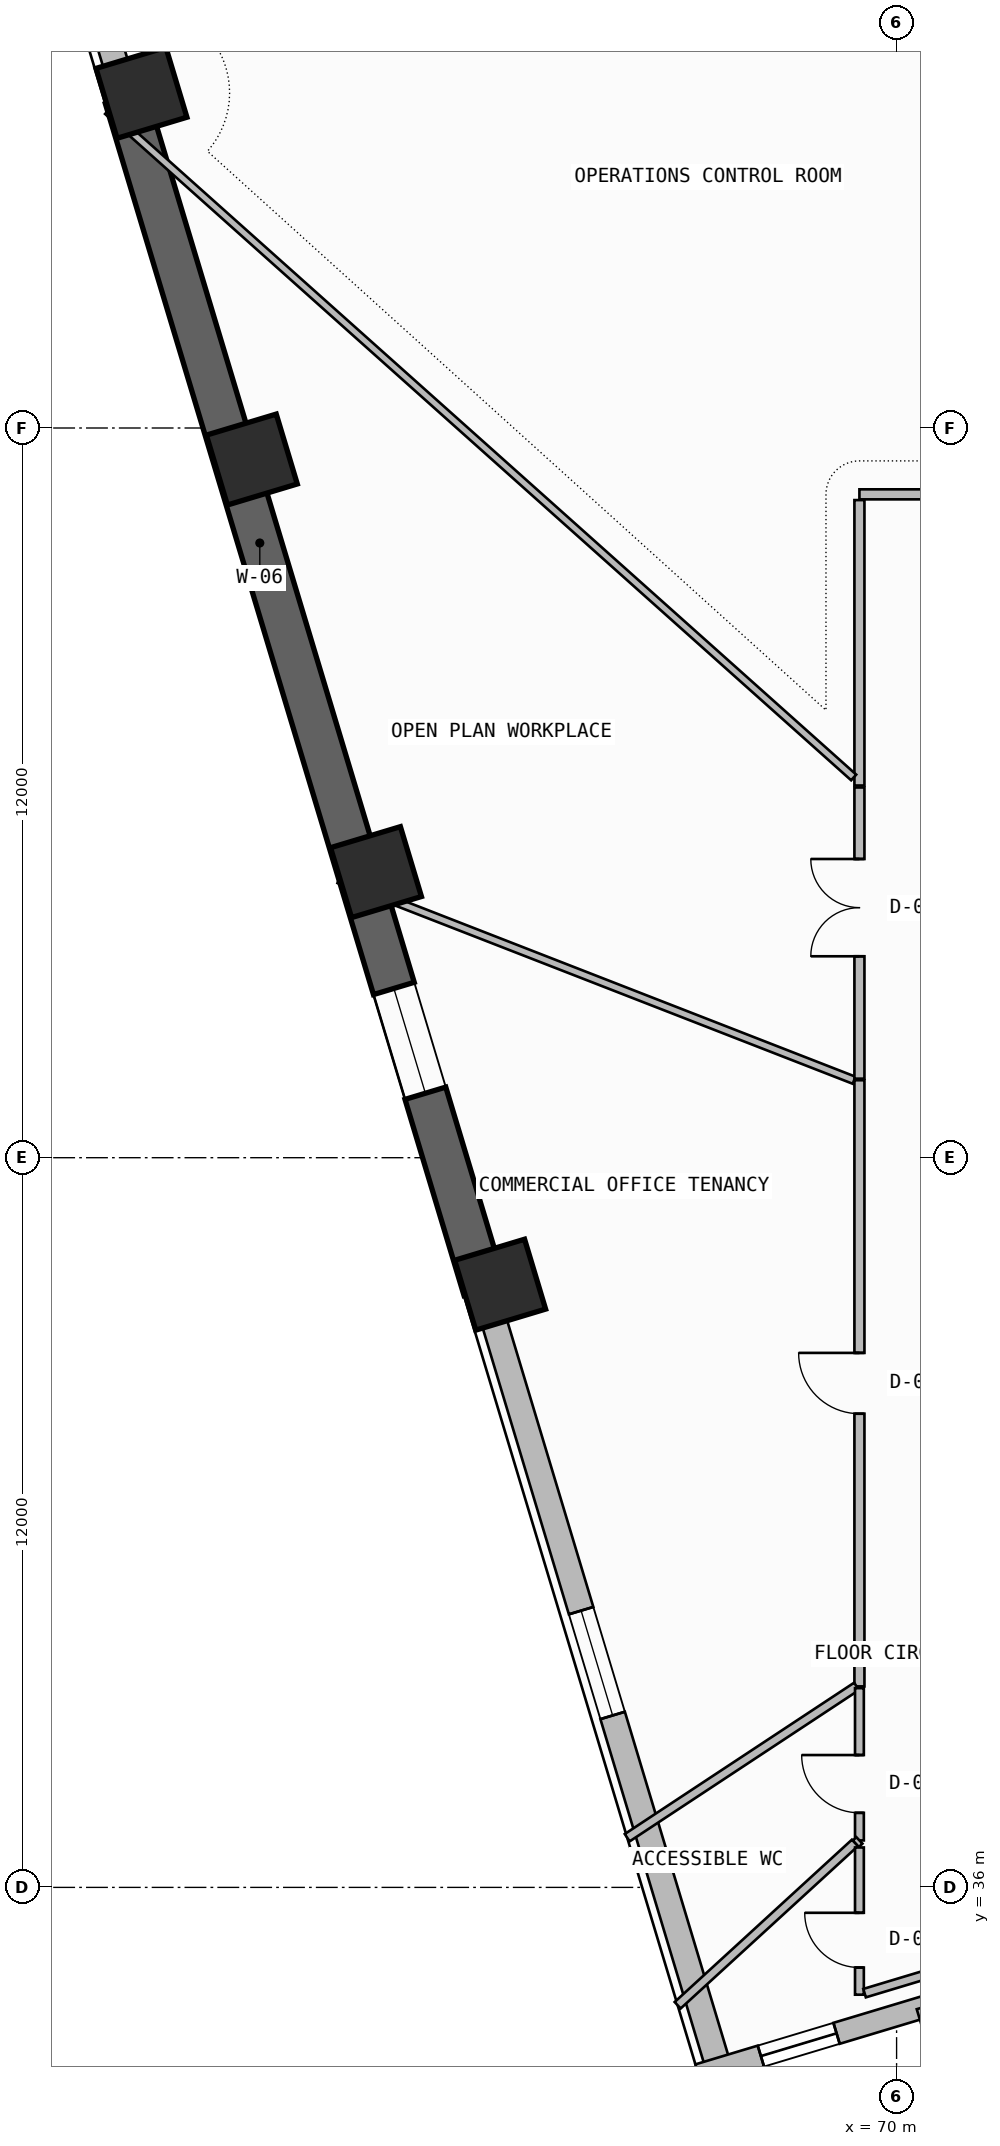
"""IFC4 building model, lengths in metres.
Left out: names, types, materials, properties, quantities, classifications, styles, units other than length and angle.
Written with IfcOpenShell. Run it as: python <this file> out.ifc"""

import sys

from ifc_helpers import new_model, si_unit, direction, frame, frame_2d, origin, origin_2d, place, context, subcontext, project, spatial, rectangle, extrude, element, fill, save


model = new_model("IFC4")
c1 = context("Model", 3, precision=1e-05, world=origin(), true_north=direction((0.0, 1.0)))
c2 = subcontext(c1, "Body", "Model", "MODEL_VIEW")
j1 = project(units=[si_unit("LENGTHUNIT", "METRE"), si_unit("PLANEANGLEUNIT", "RADIAN")], contexts=[c1])
p1 = place(None, origin())
s1 = spatial("IfcSite", under=j1, at=p1, CompositionType="ELEMENT")
p2 = place(p1, origin())
s2 = spatial("IfcBuilding", under=s1, at=p2, CompositionType="ELEMENT")
p3 = place(p2, frame((0.0, 0.0, 157.5)))
s3 = spatial("IfcBuildingStorey", under=s2, at=p3, CompositionType="ELEMENT", Elevation=157.5)
for number, where, z_axis, x_axis in (
    (1, (57.581, 65.512, 0.0), (0.0, 0.0, 1.0), (-0.288, 0.958, 0.0)),
    (2, (59.396, 59.481, 0.0), (0.0, 0.0, 1.0), (-0.288, 0.958, 0.0)),
    (3, (61.438, 52.696, 0.0), (0.0, 0.0, 1.0), (-0.288, 0.958, 0.0)),
    (4, (63.48, 45.912, 0.0), (0.0, 0.0, 1.0), (-0.288, 0.958, 0.0)),
):
    element("IfcColumn", number, at=place(p3, frame(where, z_axis=z_axis, x_axis=x_axis)), inside=s3, PredefinedType="COLUMN", context=c2, shape_type="SweptSolid", body=[
        extrude(rectangle(XDim=1.2, YDim=1.2, at=origin_2d()), origin(), (0.0, 0.0, 1.0), 3.6),
    ])
p4 = place(p3, frame((55.734, 70.711, 0.0), z_axis=(0.0, 0.0, 1.0), x_axis=(0.288221590884, -0.957563739157, 0.0)))
e5 = element("IfcWall", 5, at=p4, inside=s3, PredefinedType="SOLIDWALL", context=c2, shape_type="SweptSolid", body=[
    extrude(rectangle(XDim=5.511, YDim=0.42, at=frame_2d((2.755, 0.0))), origin(), (0.0, 0.0, 1.0), 2.725),
])
p5 = place(p4, frame((1.223, 0.0, 1.2)))
e6 = element("IfcOpeningElement", 6, at=p5, cuts=e5, PredefinedType="OPENING", context=c2, shape_type="SweptSolid", body=[
    extrude(rectangle(XDim=1.8, YDim=0.9, at=frame_2d((0.9, 0.45))), frame((0.0, 0.22, 0.0), z_axis=(0.0, -1.0, 0.0), x_axis=(1.0, 0.0, 0.0)), (0.0, 0.0, 1.0), 0.44),
])
p6 = place(p3, frame((57.323, 65.434, -0.26), z_axis=(0.0, 0.0, 1.0), x_axis=(0.288188159352, -0.957573801234, 0.0)))
e7 = element("IfcWall", 7, at=p6, inside=s3, PredefinedType="SHEAR", context=c2, shape_type="SweptSolid", body=[
    extrude(rectangle(XDim=20.469, YDim=0.7, at=frame_2d((10.234, 0.0))), origin(), (0.0, 0.0, 1.0), 3.6),
])
p7 = place(p6, frame((15.3, 0.0, 1.2)))
e8 = element("IfcOpeningElement", 8, at=p7, cuts=e7, PredefinedType="OPENING", context=c2, shape_type="SweptSolid", body=[
    extrude(rectangle(XDim=1.8, YDim=0.9, at=frame_2d((0.9, 0.45))), frame((0.0, 0.36, 0.0), z_axis=(0.0, -1.0, 0.0), x_axis=(1.0, 0.0, 0.0)), (0.0, 0.0, 1.0), 0.72),
])
p8 = place(p3, frame((63.221, 45.834, 0.0), z_axis=(0.0, 0.0, 1.0), x_axis=(0.288202962273, -0.957569346072, 0.0)))
e9 = element("IfcWall", 9, at=p8, inside=s3, PredefinedType="SOLIDWALL", context=c2, shape_type="SweptSolid", body=[
    extrude(rectangle(XDim=13.384, YDim=0.42, at=frame_2d((6.692, 0.0))), origin(), (0.0, 0.0, 1.0), 2.725),
])
p9 = place(p8, frame((5.517, 0.0, 1.2)))
e10 = element("IfcOpeningElement", 10, at=p9, cuts=e9, PredefinedType="OPENING", context=c2, shape_type="SweptSolid", body=[
    extrude(rectangle(XDim=1.8, YDim=0.9, at=frame_2d((0.9, 0.45))), frame((0.0, 0.22, 0.0), z_axis=(0.0, -1.0, 0.0), x_axis=(1.0, 0.0, 0.0)), (0.0, 0.0, 1.0), 0.44),
])
p10 = place(p3, frame((66.743, 32.917, 0.0), z_axis=(0.0, 0.0, 1.0), x_axis=(0.957584687378, 0.288151985068, 0.0)))
e11 = element("IfcWall", 11, at=p10, inside=s3, PredefinedType="SOLIDWALL", context=c2, shape_type="SweptSolid", body=[
    extrude(rectangle(XDim=3.927, YDim=0.36, at=frame_2d((1.963, 0.0))), origin(), (0.0, 0.0, 1.0), 3.34),
])
p11 = place(p10, frame((1.07, 0.0, 0.45)))
e12 = element("IfcOpeningElement", 12, at=p11, cuts=e11, PredefinedType="OPENING", context=c2, shape_type="SweptSolid", body=[
    extrude(rectangle(XDim=1.3, YDim=2.4, at=frame_2d((0.65, 1.2))), frame((0.0, 0.19, 0.0), z_axis=(0.0, -1.0, 0.0), x_axis=(1.0, 0.0, 0.0)), (0.0, 0.0, 1.0), 0.38),
])
p12 = place(p3, frame((70.504, 34.049, 0.0), z_axis=(0.0, 0.0, 1.0), x_axis=(0.288169140251, -0.957579524952, 0.0)))
e13 = element("IfcWall", 13, at=p12, inside=s3, PredefinedType="SOLIDWALL", context=c2, shape_type="SweptSolid", body=[
    extrude(rectangle(XDim=3.927, YDim=0.36, at=frame_2d((1.963, 0.0))), origin(), (0.0, 0.0, 1.0), 3.34),
])
p13 = place(p3, frame((89.368, 62.13, 0.0), z_axis=(0.0, 0.0, 1.0), x_axis=(-0.942033439765, 0.335518998515, 0.0)))
e14 = element("IfcWall", 14, at=p13, inside=s3, PredefinedType="PARAPET", context=c2, shape_type="SweptSolid", body=[
    extrude(rectangle(XDim=27.969, YDim=0.2, at=frame_2d((13.985, 0.0))), origin(), (0.0, 0.0, 1.0), 1.15),
])
p14 = place(p3, frame((69.389, 49.274, 0.0), z_axis=(0.0, 0.0, 1.0), x_axis=(0.0, -1.0, 0.0)))
e15 = element("IfcWall", 15, at=p14, inside=s3, PredefinedType="PARTITIONING", context=c2, shape_type="SweptSolid", body=[
    extrude(rectangle(XDim=9.968, YDim=0.165, at=frame_2d((4.984, 0.0))), origin(), (0.0, 0.0, 1.0), 3.34),
])
p15 = place(p14, frame((4.484, 0.0, 0.0)))
e16 = element("IfcOpeningElement", 16, at=p15, cuts=e15, PredefinedType="OPENING", context=c2, shape_type="SweptSolid", body=[
    extrude(rectangle(XDim=1.0, YDim=2.2, at=frame_2d((0.5, 1.1))), frame((0.0, 0.093, 0.0), z_axis=(0.0, -1.0, 0.0), x_axis=(1.0, 0.0, 0.0)), (0.0, 0.0, 1.0), 0.185),
])
p16 = place(p3, frame((69.342, 39.306, 0.0), z_axis=(0.0, 0.0, 1.0), x_axis=(-0.83472512809, -0.550666832608, 0.0)))
e17 = element("IfcWall", 17, at=p16, inside=s3, PredefinedType="PARTITIONING", context=c2, shape_type="SweptSolid", body=[
    extrude(rectangle(XDim=4.519, YDim=0.145, at=frame_2d((2.26, 0.0))), origin(), (0.0, 0.0, 1.0), 3.34),
])
p17 = place(p3, frame((60.827, 52.575, 0.0), z_axis=(0.0, 0.0, 1.0), x_axis=(0.931795434886, -0.362983839208, 0.0)))
e18 = element("IfcWall", 18, at=p17, inside=s3, PredefinedType="PARTITIONING", context=c2, shape_type="SweptSolid", body=[
    extrude(rectangle(XDim=9.094, YDim=0.125, at=frame_2d((4.547, 0.0))), origin(), (0.0, 0.0, 1.0), 2.725),
])
p18 = place(p3, frame((69.389, 39.277, 0.0), z_axis=(0.0, 0.0, 1.0), x_axis=(0.0, -1.0, 0.0)))
e19 = element("IfcWall", 19, at=p18, inside=s3, PredefinedType="PARTITIONING", context=c2, shape_type="SweptSolid", body=[
    extrude(rectangle(XDim=2.504, YDim=0.145, at=frame_2d((1.252, 0.0))), origin(), (0.0, 0.0, 1.0), 3.34),
])
p19 = place(p18, frame((1.1, 0.0, 0.0)))
e20 = element("IfcOpeningElement", 20, at=p19, cuts=e19, PredefinedType="OPENING", context=c2, shape_type="SweptSolid", body=[
    extrude(rectangle(XDim=0.95, YDim=2.15, at=frame_2d((0.475, 1.075))), frame((0.0, 0.083, 0.0), z_axis=(0.0, -1.0, 0.0), x_axis=(1.0, 0.0, 0.0)), (0.0, 0.0, 1.0), 0.165),
])
p20 = place(p3, frame((69.389, 36.773, 0.0), z_axis=(0.0, 0.0, 1.0), x_axis=(-0.730366580174, -0.683055384698, 0.0)))
e21 = element("IfcWall", 21, at=p20, inside=s3, PredefinedType="PARTITIONING", context=c2, shape_type="SweptSolid", body=[
    extrude(rectangle(XDim=0.083, YDim=0.145, at=frame_2d((0.041, 0.0))), origin(), (0.0, 0.0, 1.0), 3.34),
])
p21 = place(p3, frame((69.314, 36.731, 0.0), z_axis=(0.0, 0.0, 1.0), x_axis=(-0.737487298625, -0.675361002995, 0.0)))
e22 = element("IfcWall", 22, at=p21, inside=s3, PredefinedType="PARTITIONING", context=c2, shape_type="SweptSolid", body=[
    extrude(rectangle(XDim=3.953, YDim=0.145, at=frame_2d((1.977, 0.0))), origin(), (0.0, 0.0, 1.0), 3.34),
])
p22 = place(p3, frame((69.389, 36.657, 0.0), z_axis=(0.0, 0.0, 1.0), x_axis=(0.0, -1.0, 0.0)))
e23 = element("IfcWall", 23, at=p22, inside=s3, PredefinedType="PARTITIONING", context=c2, shape_type="SweptSolid", body=[
    extrude(rectangle(XDim=2.421, YDim=0.145, at=frame_2d((1.21, 0.0))), origin(), (0.0, 0.0, 1.0), 3.34),
])
p23 = place(p22, frame((1.074, 0.0, 0.0)))
e24 = element("IfcOpeningElement", 24, at=p23, cuts=e23, PredefinedType="OPENING", context=c2, shape_type="SweptSolid", body=[
    extrude(rectangle(XDim=0.9, YDim=2.1, at=frame_2d((0.45, 1.05))), frame((0.0, 0.083, 0.0), z_axis=(0.0, -1.0, 0.0), x_axis=(1.0, 0.0, 0.0)), (0.0, 0.0, 1.0), 0.165),
])
p24 = place(p3, frame((69.473, 34.261, 0.0), z_axis=(0.0, 0.0, 1.0), x_axis=(0.957576023878, 0.288180773985, 0.0)))
e25 = element("IfcWall", 25, at=p24, inside=s3, PredefinedType="PARTITIONING", context=c2, shape_type="SweptSolid", body=[
    extrude(rectangle(XDim=1.855, YDim=0.145, at=frame_2d((0.928, 0.0))), origin(), (0.0, 0.0, 1.0), 3.34),
])
p25 = place(p3, frame((75.622, 58.909, 0.0), z_axis=(0.0, 0.0, 1.0), x_axis=(-1.0, 0.0, 0.0)))
e26 = element("IfcWall", 26, at=p25, inside=s3, PredefinedType="PARTITIONING", context=c2, shape_type="SweptSolid", body=[
    extrude(rectangle(XDim=6.233, YDim=0.165, at=frame_2d((3.117, 0.0))), origin(), (0.0, 0.0, 1.0), 2.725),
])
p26 = place(p25, frame((1.892, 0.0, 0.0)))
e27 = element("IfcOpeningElement", 27, at=p26, cuts=e26, PredefinedType="OPENING", context=c2, shape_type="SweptSolid", body=[
    extrude(rectangle(XDim=1.0, YDim=2.2, at=frame_2d((0.5, 1.1))), frame((0.0, 0.093, 0.0), z_axis=(0.0, -1.0, 0.0), x_axis=(1.0, 0.0, 0.0)), (0.0, 0.0, 1.0), 0.185),
])
p27 = place(p3, frame((69.389, 58.814, 0.0), z_axis=(0.0, 0.0, 1.0), x_axis=(0.0, -1.0, 0.0)))
e28 = element("IfcWall", 28, at=p27, inside=s3, PredefinedType="PARTITIONING", context=c2, shape_type="SweptSolid", body=[
    extrude(rectangle(XDim=4.694, YDim=0.165, at=frame_2d((2.347, 0.0))), origin(), (0.0, 0.0, 1.0), 2.725),
])
p28 = place(p3, frame((69.294, 54.253, 0.0), z_axis=(0.0, 0.0, 1.0), x_axis=(-0.745872091983, 0.666089200033, 0.0)))
e29 = element("IfcWall", 29, at=p28, inside=s3, PredefinedType="PARTITIONING", context=c2, shape_type="SweptSolid", body=[
    extrude(rectangle(XDim=16.451, YDim=0.125, at=frame_2d((8.226, 0.0))), origin(), (0.0, 0.0, 1.0), 2.725),
])
p29 = place(p3, frame((69.389, 54.088, 0.0), z_axis=(0.0, 0.0, 1.0), x_axis=(0.0, -1.0, 0.0)))
e30 = element("IfcWall", 30, at=p29, inside=s3, PredefinedType="PARTITIONING", context=c2, shape_type="SweptSolid", body=[
    extrude(rectangle(XDim=4.789, YDim=0.165, at=frame_2d((2.394, 0.0))), origin(), (0.0, 0.0, 1.0), 2.725),
])
p30 = place(p29, frame((1.176, 0.0, 0.0)))
e31 = element("IfcOpeningElement", 31, at=p30, cuts=e30, PredefinedType="OPENING", context=c2, shape_type="SweptSolid", body=[
    extrude(rectangle(XDim=1.6, YDim=2.3, at=frame_2d((0.8, 1.15))), frame((0.0, 0.093, 0.0), z_axis=(0.0, -1.0, 0.0), x_axis=(1.0, 0.0, 0.0)), (0.0, 0.0, 1.0), 0.185),
])
p31 = place(p7, origin())
e32 = element("IfcWindow", 32, at=p31, inside=s3, PartitioningType="SINGLE_PANEL", PredefinedType="WINDOW", context=c2, shape_type="SweptSolid", body=[
    extrude(rectangle(XDim=1.8, YDim=0.9, at=frame_2d((0.9, 0.45))), frame((0.0, 0.03, 0.0), z_axis=(0.0, -1.0, 0.0), x_axis=(1.0, 0.0, 0.0)), (0.0, 0.0, 1.0), 0.06),
])
fill(e8, e32)
p32 = place(p9, origin())
e33 = element("IfcWindow", 33, at=p32, inside=s3, PartitioningType="SINGLE_PANEL", PredefinedType="WINDOW", context=c2, shape_type="SweptSolid", body=[
    extrude(rectangle(XDim=1.8, YDim=0.9, at=frame_2d((0.9, 0.45))), frame((0.0, 0.03, 0.0), z_axis=(0.0, -1.0, 0.0), x_axis=(1.0, 0.0, 0.0)), (0.0, 0.0, 1.0), 0.06),
])
fill(e10, e33)
p33 = place(p11, origin())
e34 = element("IfcWindow", 34, at=p33, inside=s3, PartitioningType="SINGLE_PANEL", PredefinedType="WINDOW", context=c2, shape_type="SweptSolid", body=[
    extrude(rectangle(XDim=1.3, YDim=2.4, at=frame_2d((0.65, 1.2))), frame((0.0, 0.03, 0.0), z_axis=(0.0, -1.0, 0.0), x_axis=(1.0, 0.0, 0.0)), (0.0, 0.0, 1.0), 0.06),
])
fill(e12, e34)
p34 = place(p15, frame((1.0, 0.0, 0.0), z_axis=(0.0, 0.0, 1.0), x_axis=(-1.0, 0.0, 0.0)))
e35 = element("IfcDoor", 35, at=p34, inside=s3, OperationType="SINGLE_SWING_RIGHT", PredefinedType="DOOR", context=c2, shape_type="SweptSolid", body=[
    extrude(rectangle(XDim=1.0, YDim=2.2, at=frame_2d((0.5, 1.1))), frame((0.0, 0.025, 0.0), z_axis=(0.0, -1.0, 0.0), x_axis=(1.0, 0.0, 0.0)), (0.0, 0.0, 1.0), 0.05),
])
fill(e16, e35)
p35 = place(p19, frame((0.95, 0.0, 0.0), z_axis=(0.0, 0.0, 1.0), x_axis=(-1.0, 0.0, 0.0)))
e36 = element("IfcDoor", 36, at=p35, inside=s3, OperationType="SINGLE_SWING_RIGHT", PredefinedType="DOOR", context=c2, shape_type="SweptSolid", body=[
    extrude(rectangle(XDim=0.95, YDim=2.15, at=frame_2d((0.475, 1.075))), frame((0.0, 0.025, 0.0), z_axis=(0.0, -1.0, 0.0), x_axis=(1.0, 0.0, 0.0)), (0.0, 0.0, 1.0), 0.05),
])
fill(e20, e36)
p36 = place(p23, frame((0.9, 0.0, 0.0), z_axis=(0.0, 0.0, 1.0), x_axis=(-1.0, 0.0, 0.0)))
e37 = element("IfcDoor", 37, at=p36, inside=s3, OperationType="SINGLE_SWING_RIGHT", PredefinedType="DOOR", context=c2, shape_type="SweptSolid", body=[
    extrude(rectangle(XDim=0.9, YDim=2.1, at=frame_2d((0.45, 1.05))), frame((0.0, 0.025, 0.0), z_axis=(0.0, -1.0, 0.0), x_axis=(1.0, 0.0, 0.0)), (0.0, 0.0, 1.0), 0.05),
])
fill(e24, e37)
p37 = place(p30, frame((1.6, 0.0, 0.0), z_axis=(0.0, 0.0, 1.0), x_axis=(-1.0, 0.0, 0.0)))
e38 = element("IfcDoor", 38, at=p37, inside=s3, OperationType="DOUBLE_DOOR_SINGLE_SWING", PredefinedType="DOOR", context=c2, shape_type="SweptSolid", body=[
    extrude(rectangle(XDim=1.6, YDim=2.3, at=frame_2d((0.8, 1.15))), frame((0.0, 0.025, 0.0), z_axis=(0.0, -1.0, 0.0), x_axis=(1.0, 0.0, 0.0)), (0.0, 0.0, 1.0), 0.05),
])
fill(e31, e38)
save(model, sys.argv[1])
